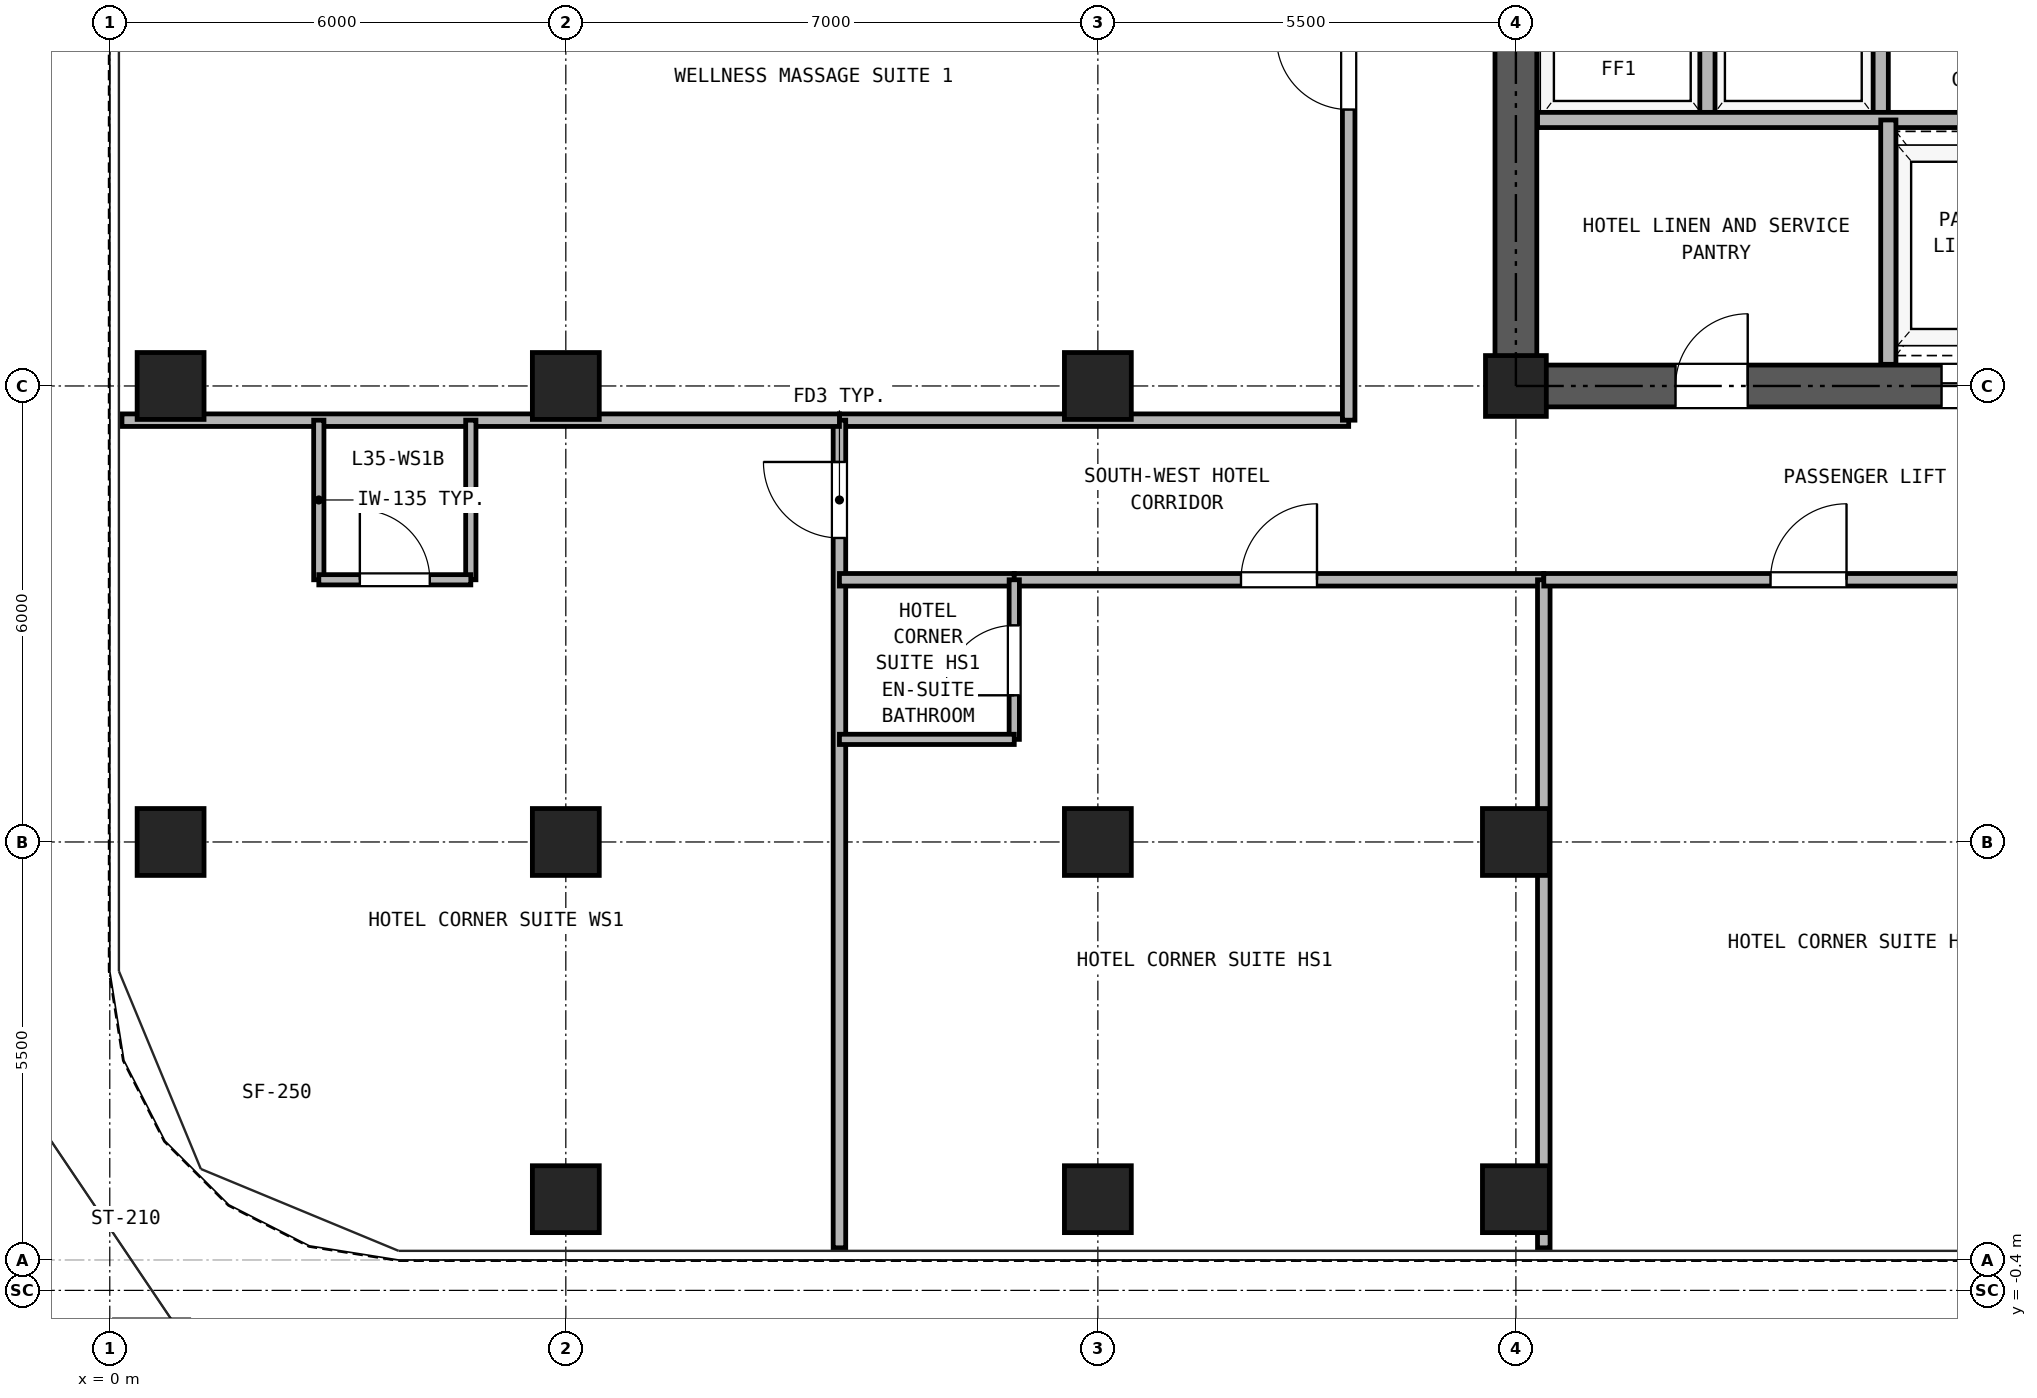
"""IFC4 building model, lengths in metres.
Left out: names, types, materials, properties, quantities, classifications, styles, units other than length and angle.
Written with IfcOpenShell. Run it as: python <this file> out.ifc"""

import sys

from ifc_helpers import new_model, si_unit, direction, frame, frame_2d, origin, origin_2d, place, context, subcontext, project, spatial, rectangle, hollow_rectangle, extrude, source, transform, mapped, element, fill, save


model = new_model("IFC4")
c1 = context("Model", 3, precision=1e-05, world=origin(), true_north=direction((0.0, 1.0)))
c2 = subcontext(c1, "Body", "Model", "MODEL_VIEW")
j1 = project(units=[si_unit("LENGTHUNIT", "METRE"), si_unit("PLANEANGLEUNIT", "RADIAN")], contexts=[c1])
p1 = place(None, origin())
s1 = spatial("IfcSite", under=j1, at=p1, CompositionType="ELEMENT")
p2 = place(p1, origin())
s2 = spatial("IfcBuilding", under=s1, at=p2, CompositionType="ELEMENT")
p3 = place(p2, frame((0.0, 0.0, 127.9)))
s3 = spatial("IfcBuildingStorey", under=s2, at=p3, CompositionType="ELEMENT", Elevation=127.9)
m1 = source(origin(), c2, "Body", "SweptSolid", [
    extrude(hollow_rectangle(XDim=0.88, YDim=0.88, WallThickness=0.05, at=origin_2d()), origin(), (0.0, 0.0, 1.0), 2.95),
])
for number, where, z_axis, x_axis in (
    (1, (6.0, 0.8, 0.0), (0.0, 0.0, 1.0), (1.0, 0.0, 0.0)),
    (2, (13.0, 0.8, 0.0), (0.0, 0.0, 1.0), (1.0, 0.0, 0.0)),
    (3, (18.5, 0.8, 0.0), (0.0, 0.0, 1.0), (1.0, 0.0, 0.0)),
    (4, (0.8, 5.5, 0.0), (0.0, 0.0, 1.0), (1.0, 0.0, 0.0)),
    (5, (0.8, 11.5, 0.0), (0.0, 0.0, 1.0), (1.0, 0.0, 0.0)),
    (6, (6.0, 5.5, 0.0), (0.0, 0.0, 1.0), (1.0, 0.0, 0.0)),
    (7, (6.0, 11.5, 0.0), (0.0, 0.0, 1.0), (1.0, 0.0, 0.0)),
    (8, (13.0, 5.5, 0.0), (0.0, 0.0, 1.0), (1.0, 0.0, 0.0)),
    (9, (13.0, 11.5, 0.0), (0.0, 0.0, 1.0), (1.0, 0.0, 0.0)),
    (10, (18.5, 5.5, 0.0), (0.0, 0.0, 1.0), (1.0, 0.0, 0.0)),
):
    element("IfcColumn", number, at=place(p3, frame(where, z_axis=z_axis, x_axis=x_axis)), inside=s3, PredefinedType="COLUMN", context=c2, shape_type="MappedRepresentation", body=[
        mapped(m1, transform((0.0, 0.0, 0.0), x_axis=(1.0, 0.0, 0.0), y_axis=(0.0, 1.0, 0.0), z_axis=(0.0, 0.0, 1.0), scale=1.0)),
    ])
m2 = source(origin(), c2, "Body", "SweptSolid", [
    extrude(hollow_rectangle(XDim=0.8, YDim=0.8, WallThickness=0.045, at=origin_2d()), origin(), (0.0, 0.0, 1.0), 2.95),
])
p4 = place(p3, frame((18.5, 11.5, 0.0), z_axis=(0.0, 0.0, 1.0), x_axis=(1.0, 0.0, 0.0)))
e11 = element("IfcColumn", 11, at=p4, inside=s3, PredefinedType="COLUMN", context=c2, shape_type="MappedRepresentation", body=[
    mapped(m2, transform((0.0, 0.0, 0.0), x_axis=(1.0, 0.0, 0.0), y_axis=(0.0, 1.0, 0.0), z_axis=(0.0, 0.0, 1.0), scale=1.0)),
])
p5 = place(p3, frame((18.225, 11.5, 0.0), z_axis=(0.0, 0.0, 1.0), x_axis=(1.0, 0.0, 0.0)))
e12 = element("IfcWall", 12, at=p5, inside=s3, PredefinedType="SHEAR", context=c2, shape_type="SweptSolid", body=[
    extrude(rectangle(XDim=10.55, YDim=0.55, at=frame_2d((5.275, 0.0))), origin(), (0.0, 0.0, 1.0), 2.95),
])
p6 = place(p5, frame((2.375, 0.0, 0.0)))
e13 = element("IfcOpeningElement", 13, at=p6, cuts=e12, PredefinedType="OPENING", context=c2, shape_type="SweptSolid", body=[
    extrude(rectangle(XDim=0.95, YDim=2.15, at=frame_2d((0.475, 1.075))), frame((0.0, 0.285, 0.0), z_axis=(0.0, -1.0, 0.0), x_axis=(1.0, 0.0, 0.0)), (0.0, 0.0, 1.0), 0.57),
])
p7 = place(p5, frame((5.875, 0.0, 0.0)))
e14 = element("IfcOpeningElement", 14, at=p7, cuts=e12, PredefinedType="OPENING", context=c2, shape_type="SweptSolid", body=[
    extrude(rectangle(XDim=1.1, YDim=2.25, at=frame_2d((0.55, 1.125))), frame((0.0, 0.285, 0.0), z_axis=(0.0, -1.0, 0.0), x_axis=(1.0, 0.0, 0.0)), (0.0, 0.0, 1.0), 0.57),
])
p8 = place(p5, frame((8.275, 0.0, 0.0)))
e15 = element("IfcOpeningElement", 15, at=p8, cuts=e12, PredefinedType="OPENING", context=c2, shape_type="SweptSolid", body=[
    extrude(rectangle(XDim=1.1, YDim=2.25, at=frame_2d((0.55, 1.125))), frame((0.0, 0.285, 0.0), z_axis=(0.0, -1.0, 0.0), x_axis=(1.0, 0.0, 0.0)), (0.0, 0.0, 1.0), 0.57),
])
p9 = place(p3, frame((18.5, 11.775, 0.0), z_axis=(0.0, 0.0, 1.0), x_axis=(0.0, 1.0, 0.0)))
e16 = element("IfcWall", 16, at=p9, inside=s3, PredefinedType="SHEAR", context=c2, shape_type="SweptSolid", body=[
    extrude(rectangle(XDim=16.7, YDim=0.55, at=frame_2d((8.35, 0.0))), origin(), (0.0, 0.0, 1.0), 2.95),
])
p10 = place(p9, frame((7.375, 0.0, 0.0)))
e17 = element("IfcOpeningElement", 17, at=p10, cuts=e16, PredefinedType="OPENING", context=c2, shape_type="SweptSolid", body=[
    extrude(rectangle(XDim=1.15, YDim=2.2, at=frame_2d((0.575, 1.1))), frame((0.0, 0.285, 0.0), z_axis=(0.0, -1.0, 0.0), x_axis=(1.0, 0.0, 0.0)), (0.0, 0.0, 1.0), 0.57),
])
for number, where, z_axis, x_axis in (
    (18, (21.02, 15.0, 0.0), (0.0, 0.0, 1.0), (0.0, 1.0, 0.0)),
    (19, (23.3, 15.0, 0.0), (0.0, 0.0, 1.0), (0.0, 1.0, 0.0)),
):
    element("IfcWall", number, at=place(p3, frame(where, z_axis=z_axis, x_axis=x_axis)), inside=s3, PredefinedType="PARTITIONING", context=c2, shape_type="SweptSolid", body=[
        extrude(rectangle(XDim=3.0, YDim=0.2, at=frame_2d((1.5, 0.0))), origin(), (0.0, 0.0, 1.0), 2.95),
    ])
p11 = place(p3, frame((18.785, 15.0, 0.0), z_axis=(0.0, 0.0, 1.0), x_axis=(1.0, 0.0, 0.0)))
e20 = element("IfcWall", 20, at=p11, inside=s3, PredefinedType="PARTITIONING", context=c2, shape_type="SweptSolid", body=[
    extrude(rectangle(XDim=9.43, YDim=0.2, at=frame_2d((4.715, 0.0))), origin(), (0.0, 0.0, 1.0), 2.95),
])
p12 = place(p3, frame((23.4, 11.785, 0.0), z_axis=(0.0, 0.0, 1.0), x_axis=(0.0, 1.0, 0.0)))
e21 = element("IfcWall", 21, at=p12, inside=s3, PredefinedType="PARTITIONING", context=c2, shape_type="SweptSolid", body=[
    extrude(rectangle(XDim=3.215, YDim=0.2, at=frame_2d((1.607, 0.0))), origin(), (0.0, 0.0, 1.0), 2.95),
])
p13 = place(p3, frame((9.6, 11.05, 0.0), z_axis=(0.0, 0.0, 1.0), x_axis=(1.0, 0.0, 0.0)))
e22 = element("IfcWall", 22, at=p13, inside=s3, PredefinedType="PARTITIONING", context=c2, shape_type="SweptSolid", body=[
    extrude(rectangle(XDim=6.7, YDim=0.165, at=frame_2d((3.35, 0.0))), origin(), (0.0, 0.0, 1.0), 2.95),
])
p14 = place(p3, frame((16.3, 11.05, 0.0), z_axis=(0.0, 0.0, 1.0), x_axis=(0.0, 1.0, 0.0)))
e23 = element("IfcWall", 23, at=p14, inside=s3, PredefinedType="PARTITIONING", context=c2, shape_type="SweptSolid", body=[
    extrude(rectangle(XDim=18.35, YDim=0.165, at=frame_2d((9.175, 0.0))), origin(), (0.0, 0.0, 1.0), 2.95),
])
p15 = place(p14, frame((4.087, 0.0, 0.0)))
e24 = element("IfcOpeningElement", 24, at=p15, cuts=e23, PredefinedType="OPENING", context=c2, shape_type="SweptSolid", body=[
    extrude(rectangle(XDim=0.95, YDim=2.15, at=frame_2d((0.475, 1.075))), frame((0.0, 0.093, 0.0), z_axis=(0.0, -1.0, 0.0), x_axis=(1.0, 0.0, 0.0)), (0.0, 0.0, 1.0), 0.185),
])
p16 = place(p14, frame((13.262, 0.0, 0.0)))
e25 = element("IfcOpeningElement", 25, at=p16, cuts=e23, PredefinedType="OPENING", context=c2, shape_type="SweptSolid", body=[
    extrude(rectangle(XDim=0.95, YDim=2.15, at=frame_2d((0.475, 1.075))), frame((0.0, 0.093, 0.0), z_axis=(0.0, -1.0, 0.0), x_axis=(1.0, 0.0, 0.0)), (0.0, 0.0, 1.0), 0.185),
])
p17 = place(p3, frame((9.6, 0.16, 0.0), z_axis=(0.0, 0.0, 1.0), x_axis=(0.0, 1.0, 0.0)))
e26 = element("IfcWall", 26, at=p17, inside=s3, PredefinedType="PARTITIONING", context=c2, shape_type="SweptSolid", body=[
    extrude(rectangle(XDim=10.89, YDim=0.165, at=frame_2d((5.445, 0.0))), origin(), (0.0, 0.0, 1.0), 2.95),
])
p18 = place(p17, frame((9.34, 0.0, 0.0)))
e27 = element("IfcOpeningElement", 27, at=p18, cuts=e26, PredefinedType="OPENING", context=c2, shape_type="SweptSolid", body=[
    extrude(rectangle(XDim=1.0, YDim=2.15, at=frame_2d((0.5, 1.075))), frame((0.0, 0.093, 0.0), z_axis=(0.0, -1.0, 0.0), x_axis=(1.0, 0.0, 0.0)), (0.0, 0.0, 1.0), 0.185),
])
p19 = place(p3, frame((0.16, 11.05, 0.0), z_axis=(0.0, 0.0, 1.0), x_axis=(1.0, 0.0, 0.0)))
e28 = element("IfcWall", 28, at=p19, inside=s3, PredefinedType="PARTITIONING", context=c2, shape_type="SweptSolid", body=[
    extrude(rectangle(XDim=9.44, YDim=0.165, at=frame_2d((4.72, 0.0))), origin(), (0.0, 0.0, 1.0), 2.95),
])
for number, where, z_axis, x_axis in (
    (29, (2.75, 8.95, 0.0), (0.0, 0.0, 1.0), (0.0, 1.0, 0.0)),
    (30, (4.75, 8.95, 0.0), (0.0, 0.0, 1.0), (0.0, 1.0, 0.0)),
):
    element("IfcWall", number, at=place(p3, frame(where, z_axis=z_axis, x_axis=x_axis)), inside=s3, PredefinedType="PARTITIONING", context=c2, shape_type="SweptSolid", body=[
        extrude(rectangle(XDim=2.1, YDim=0.135, at=frame_2d((1.05, 0.0))), origin(), (0.0, 0.0, 1.0), 2.95),
    ])
p20 = place(p3, frame((2.75, 8.95, 0.0), z_axis=(0.0, 0.0, 1.0), x_axis=(1.0, 0.0, 0.0)))
e31 = element("IfcWall", 31, at=p20, inside=s3, PredefinedType="PARTITIONING", context=c2, shape_type="SweptSolid", body=[
    extrude(rectangle(XDim=2.0, YDim=0.135, at=frame_2d((1.0, 0.0))), origin(), (0.0, 0.0, 1.0), 2.95),
])
p21 = place(p20, frame((0.54, 0.0, 0.0)))
e32 = element("IfcOpeningElement", 32, at=p21, cuts=e31, PredefinedType="OPENING", context=c2, shape_type="SweptSolid", body=[
    extrude(rectangle(XDim=0.92, YDim=2.1, at=frame_2d((0.46, 1.05))), frame((0.0, 0.077, 0.0), z_axis=(0.0, -1.0, 0.0), x_axis=(1.0, 0.0, 0.0)), (0.0, 0.0, 1.0), 0.155),
])
p22 = place(p3, frame((9.6, 8.95, 0.0), z_axis=(0.0, 0.0, 1.0), x_axis=(1.0, 0.0, 0.0)))
e33 = element("IfcWall", 33, at=p22, inside=s3, PredefinedType="PARTITIONING", context=c2, shape_type="SweptSolid", body=[
    extrude(rectangle(XDim=2.3, YDim=0.165, at=frame_2d((1.15, 0.0))), origin(), (0.0, 0.0, 1.0), 2.95),
])
p23 = place(p3, frame((11.9, 8.95, 0.0), z_axis=(0.0, 0.0, 1.0), x_axis=(1.0, 0.0, 0.0)))
e34 = element("IfcWall", 34, at=p23, inside=s3, PredefinedType="PARTITIONING", context=c2, shape_type="SweptSolid", body=[
    extrude(rectangle(XDim=6.967, YDim=0.165, at=frame_2d((3.483, 0.0))), origin(), (0.0, 0.0, 1.0), 2.95),
])
p24 = place(p23, frame((2.983, 0.0, 0.0)))
e35 = element("IfcOpeningElement", 35, at=p24, cuts=e34, PredefinedType="OPENING", context=c2, shape_type="SweptSolid", body=[
    extrude(rectangle(XDim=1.0, YDim=2.15, at=frame_2d((0.5, 1.075))), frame((0.0, 0.093, 0.0), z_axis=(0.0, -1.0, 0.0), x_axis=(1.0, 0.0, 0.0)), (0.0, 0.0, 1.0), 0.185),
])
p25 = place(p3, frame((11.9, 6.85, 0.0), z_axis=(0.0, 0.0, 1.0), x_axis=(0.0, 1.0, 0.0)))
e36 = element("IfcWall", 36, at=p25, inside=s3, PredefinedType="PARTITIONING", context=c2, shape_type="SweptSolid", body=[
    extrude(rectangle(XDim=2.1, YDim=0.135, at=frame_2d((1.05, 0.0))), origin(), (0.0, 0.0, 1.0), 2.95),
])
p26 = place(p25, frame((0.58, 0.0, 0.0)))
e37 = element("IfcOpeningElement", 37, at=p26, cuts=e36, PredefinedType="OPENING", context=c2, shape_type="SweptSolid", body=[
    extrude(rectangle(XDim=0.92, YDim=2.1, at=frame_2d((0.46, 1.05))), frame((0.0, 0.077, 0.0), z_axis=(0.0, -1.0, 0.0), x_axis=(1.0, 0.0, 0.0)), (0.0, 0.0, 1.0), 0.155),
])
p27 = place(p3, frame((9.6, 6.85, 0.0), z_axis=(0.0, 0.0, 1.0), x_axis=(1.0, 0.0, 0.0)))
e38 = element("IfcWall", 38, at=p27, inside=s3, PredefinedType="PARTITIONING", context=c2, shape_type="SweptSolid", body=[
    extrude(rectangle(XDim=2.3, YDim=0.135, at=frame_2d((1.15, 0.0))), origin(), (0.0, 0.0, 1.0), 2.95),
])
p28 = place(p3, frame((18.867, 0.16, 0.0), z_axis=(0.0, 0.0, 1.0), x_axis=(0.0, 1.0, 0.0)))
e39 = element("IfcWall", 39, at=p28, inside=s3, PredefinedType="PARTITIONING", context=c2, shape_type="SweptSolid", body=[
    extrude(rectangle(XDim=8.79, YDim=0.165, at=frame_2d((4.395, 0.0))), origin(), (0.0, 0.0, 1.0), 2.95),
])
p29 = place(p3, frame((18.867, 8.95, 0.0), z_axis=(0.0, 0.0, 1.0), x_axis=(1.0, 0.0, 0.0)))
e40 = element("IfcWall", 40, at=p29, inside=s3, PredefinedType="PARTITIONING", context=c2, shape_type="SweptSolid", body=[
    extrude(rectangle(XDim=6.966, YDim=0.165, at=frame_2d((3.483, 0.0))), origin(), (0.0, 0.0, 1.0), 2.95),
])
p30 = place(p29, frame((2.983, 0.0, 0.0)))
e41 = element("IfcOpeningElement", 41, at=p30, cuts=e40, PredefinedType="OPENING", context=c2, shape_type="SweptSolid", body=[
    extrude(rectangle(XDim=1.0, YDim=2.15, at=frame_2d((0.5, 1.075))), frame((0.0, 0.093, 0.0), z_axis=(0.0, -1.0, 0.0), x_axis=(1.0, 0.0, 0.0)), (0.0, 0.0, 1.0), 0.185),
])
p31 = place(p6, frame((0.95, 0.0, 0.0), z_axis=(0.0, 0.0, 1.0), x_axis=(-1.0, 0.0, 0.0)))
e42 = element("IfcDoor", 42, at=p31, inside=s3, OperationType="SINGLE_SWING_RIGHT", PredefinedType="DOOR", context=c2, shape_type="SweptSolid", body=[
    extrude(rectangle(XDim=0.95, YDim=2.15, at=frame_2d((0.475, 1.075))), frame((0.0, 0.025, 0.0), z_axis=(0.0, -1.0, 0.0), x_axis=(1.0, 0.0, 0.0)), (0.0, 0.0, 1.0), 0.05),
])
fill(e13, e42)
p32 = place(p7, frame((1.1, 0.0, 0.0), z_axis=(0.0, 0.0, 1.0), x_axis=(-1.0, 0.0, 0.0)))
e43 = element("IfcDoor", 43, at=p32, inside=s3, OperationType="DOUBLE_DOOR_SLIDING", PredefinedType="DOOR", context=c2, shape_type="SweptSolid", body=[
    extrude(rectangle(XDim=1.1, YDim=2.25, at=frame_2d((0.55, 1.125))), frame((0.0, 0.025, 0.0), z_axis=(0.0, -1.0, 0.0), x_axis=(1.0, 0.0, 0.0)), (0.0, 0.0, 1.0), 0.05),
])
fill(e14, e43)
p33 = place(p21, origin())
e44 = element("IfcDoor", 44, at=p33, inside=s3, OperationType="SINGLE_SWING_LEFT", PredefinedType="DOOR", context=c2, shape_type="SweptSolid", body=[
    extrude(rectangle(XDim=0.92, YDim=2.1, at=frame_2d((0.46, 1.05))), frame((0.0, 0.025, 0.0), z_axis=(0.0, -1.0, 0.0), x_axis=(1.0, 0.0, 0.0)), (0.0, 0.0, 1.0), 0.05),
])
fill(e32, e44)
p34 = place(p18, origin())
e45 = element("IfcDoor", 45, at=p34, inside=s3, OperationType="SINGLE_SWING_RIGHT", PredefinedType="DOOR", context=c2, shape_type="SweptSolid", body=[
    extrude(rectangle(XDim=1.0, YDim=2.15, at=frame_2d((0.5, 1.075))), frame((0.0, 0.025, 0.0), z_axis=(0.0, -1.0, 0.0), x_axis=(1.0, 0.0, 0.0)), (0.0, 0.0, 1.0), 0.05),
])
fill(e27, e45)
p35 = place(p26, frame((0.92, 0.0, 0.0), z_axis=(0.0, 0.0, 1.0), x_axis=(-1.0, 0.0, 0.0)))
e46 = element("IfcDoor", 46, at=p35, inside=s3, OperationType="SINGLE_SWING_LEFT", PredefinedType="DOOR", context=c2, shape_type="SweptSolid", body=[
    extrude(rectangle(XDim=0.92, YDim=2.1, at=frame_2d((0.46, 1.05))), frame((0.0, 0.025, 0.0), z_axis=(0.0, -1.0, 0.0), x_axis=(1.0, 0.0, 0.0)), (0.0, 0.0, 1.0), 0.05),
])
fill(e37, e46)
p36 = place(p24, frame((1.0, 0.0, 0.0), z_axis=(0.0, 0.0, 1.0), x_axis=(-1.0, 0.0, 0.0)))
e47 = element("IfcDoor", 47, at=p36, inside=s3, OperationType="SINGLE_SWING_RIGHT", PredefinedType="DOOR", context=c2, shape_type="SweptSolid", body=[
    extrude(rectangle(XDim=1.0, YDim=2.15, at=frame_2d((0.5, 1.075))), frame((0.0, 0.025, 0.0), z_axis=(0.0, -1.0, 0.0), x_axis=(1.0, 0.0, 0.0)), (0.0, 0.0, 1.0), 0.05),
])
fill(e35, e47)
p37 = place(p30, frame((1.0, 0.0, 0.0), z_axis=(0.0, 0.0, 1.0), x_axis=(-1.0, 0.0, 0.0)))
e48 = element("IfcDoor", 48, at=p37, inside=s3, OperationType="SINGLE_SWING_RIGHT", PredefinedType="DOOR", context=c2, shape_type="SweptSolid", body=[
    extrude(rectangle(XDim=1.0, YDim=2.15, at=frame_2d((0.5, 1.075))), frame((0.0, 0.025, 0.0), z_axis=(0.0, -1.0, 0.0), x_axis=(1.0, 0.0, 0.0)), (0.0, 0.0, 1.0), 0.05),
])
fill(e41, e48)
p38 = place(p15, frame((0.95, 0.0, 0.0), z_axis=(0.0, 0.0, 1.0), x_axis=(-1.0, 0.0, 0.0)))
e49 = element("IfcDoor", 49, at=p38, inside=s3, OperationType="SINGLE_SWING_RIGHT", PredefinedType="DOOR", context=c2, shape_type="SweptSolid", body=[
    extrude(rectangle(XDim=0.95, YDim=2.15, at=frame_2d((0.475, 1.075))), frame((0.0, 0.025, 0.0), z_axis=(0.0, -1.0, 0.0), x_axis=(1.0, 0.0, 0.0)), (0.0, 0.0, 1.0), 0.05),
])
fill(e24, e49)
save(model, sys.argv[1])
